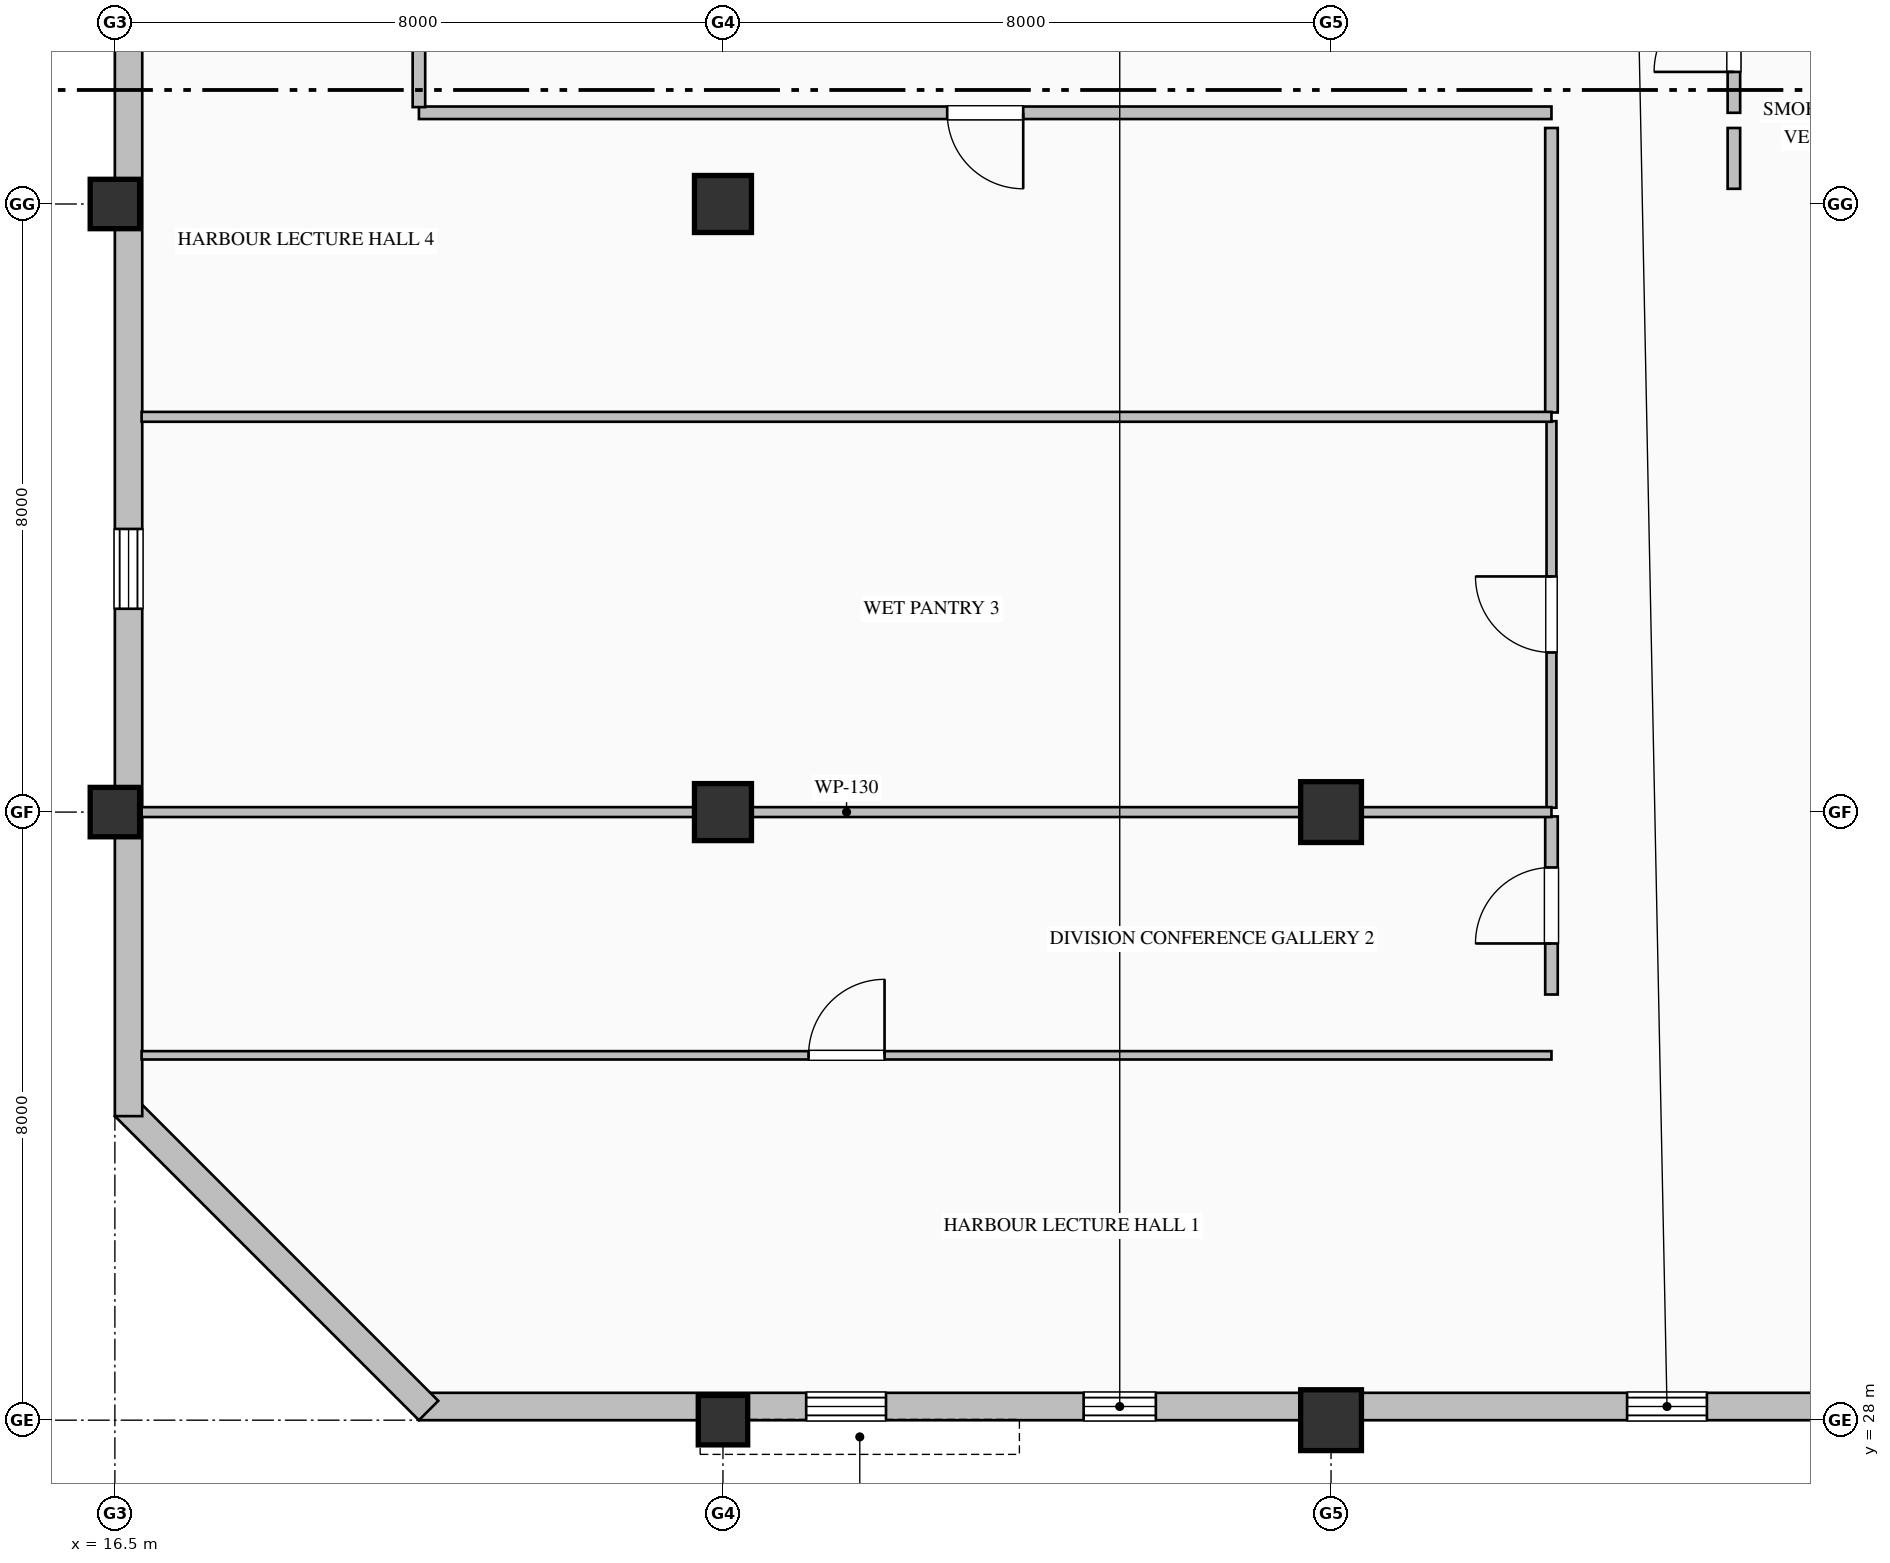
"""IFC4 building model, lengths in metres.
Left out: names, types, materials, properties, quantities, classifications, styles, units other than length and angle.
Written with IfcOpenShell. Run it as: python <this file> out.ifc"""

import sys

from ifc_helpers import new_model, si_unit, direction, frame, frame_2d, origin, origin_2d, place, context, subcontext, project, spatial, rectangle, hollow_rectangle, extrude, element, fill, save


model = new_model("IFC4")
c1 = context("Model", 3, precision=1e-05, world=origin(), true_north=direction((0.0, 1.0)))
c2 = subcontext(c1, "Body", "Model", "MODEL_VIEW")
j1 = project(units=[si_unit("LENGTHUNIT", "METRE"), si_unit("PLANEANGLEUNIT", "RADIAN")], contexts=[c1])
p1 = place(None, origin())
s1 = spatial("IfcSite", under=j1, at=p1, CompositionType="ELEMENT")
p2 = place(p1, origin())
s2 = spatial("IfcBuilding", under=s1, at=p2, CompositionType="ELEMENT")
p3 = place(p2, frame((0.0, 0.0, 311.2)))
s3 = spatial("IfcBuildingStorey", under=s2, at=p3, CompositionType="ELEMENT", Elevation=311.2)
for number, where, z_axis, x_axis in (
    (1, (16.5, 36.0, 0.0), (0.0, 0.0, 1.0), (1.0, 0.0, 0.0)),
    (2, (16.5, 44.0, 0.0), (0.0, 0.0, 1.0), (1.0, 0.0, 0.0)),
    (3, (24.5, 28.0, 0.0), (0.0, 0.0, 1.0), (1.0, 0.0, 0.0)),
):
    element("IfcColumn", number, at=place(p3, frame(where, z_axis=z_axis, x_axis=x_axis)), inside=s3, PredefinedType="COLUMN", context=c2, shape_type="SweptSolid", body=[
        extrude(hollow_rectangle(XDim=0.65, YDim=0.65, WallThickness=0.028, at=origin_2d()), origin(), (0.0, 0.0, 1.0), 4.0),
    ])
for number, where, z_axis, x_axis in (
    (4, (24.5, 36.0, 0.0), (0.0, 0.0, 1.0), (1.0, 0.0, 0.0)),
    (5, (24.5, 44.0, 0.0), (0.0, 0.0, 1.0), (1.0, 0.0, 0.0)),
):
    element("IfcColumn", number, at=place(p3, frame(where, z_axis=z_axis, x_axis=x_axis)), inside=s3, PredefinedType="COLUMN", context=c2, shape_type="SweptSolid", body=[
        extrude(rectangle(XDim=0.75, YDim=0.75, at=origin_2d()), origin(), (0.0, 0.0, 1.0), 4.0),
    ])
for number, where, z_axis, x_axis in (
    (6, (32.5, 28.0, 0.0), (0.0, 0.0, 1.0), (1.0, 0.0, 0.0)),
    (7, (32.5, 36.0, 0.0), (0.0, 0.0, 1.0), (1.0, 0.0, 0.0)),
):
    element("IfcColumn", number, at=place(p3, frame(where, z_axis=z_axis, x_axis=x_axis)), inside=s3, PredefinedType="COLUMN", context=c2, shape_type="SweptSolid", body=[
        extrude(hollow_rectangle(XDim=0.8, YDim=0.8, WallThickness=0.032, at=origin_2d()), origin(), (0.0, 0.0, 1.0), 4.0),
    ])
p4 = place(p3, frame((40.52, 28.18, 0.0), z_axis=(0.0, 0.0, 1.0), x_axis=(-1.0, 0.0, 0.0)))
e8 = element("IfcWall", 8, at=p4, inside=s3, PredefinedType="SOLIDWALL", context=c2, shape_type="SweptSolid", body=[
    extrude(rectangle(XDim=20.02, YDim=0.36, at=frame_2d((10.01, 0.0))), origin(), (0.0, 0.0, 1.0), 3.185),
])
p5 = place(p4, frame((3.075, 0.0, 0.8)))
e9 = element("IfcOpeningElement", 9, at=p5, cuts=e8, PredefinedType="OPENING", context=c2, shape_type="SweptSolid", body=[
    extrude(rectangle(XDim=1.05, YDim=2.15, at=frame_2d((0.525, 1.075))), frame((0.0, 0.19, 0.0), z_axis=(0.0, -1.0, 0.0), x_axis=(1.0, 0.0, 0.0)), (0.0, 0.0, 1.0), 0.38),
])
p6 = place(p4, frame((10.325, 0.0, 0.9)))
e10 = element("IfcOpeningElement", 10, at=p6, cuts=e8, PredefinedType="OPENING", context=c2, shape_type="SweptSolid", body=[
    extrude(rectangle(XDim=0.95, YDim=1.85, at=frame_2d((0.475, 0.925))), frame((0.0, 0.19, 0.0), z_axis=(0.0, -1.0, 0.0), x_axis=(1.0, 0.0, 0.0)), (0.0, 0.0, 1.0), 0.38),
])
p7 = place(p4, frame((13.875, 0.0, 0.8)))
e11 = element("IfcOpeningElement", 11, at=p7, cuts=e8, PredefinedType="OPENING", context=c2, shape_type="SweptSolid", body=[
    extrude(rectangle(XDim=1.05, YDim=2.15, at=frame_2d((0.525, 1.075))), frame((0.0, 0.19, 0.0), z_axis=(0.0, -1.0, 0.0), x_axis=(1.0, 0.0, 0.0)), (0.0, 0.0, 1.0), 0.38),
])
p8 = place(p3, frame((20.627, 28.127, 0.0), z_axis=(0.0, 0.0, 1.0), x_axis=(-0.707106781187, 0.707106781187, 0.0)))
e12 = element("IfcWall", 12, at=p8, inside=s3, PredefinedType="SOLIDWALL", context=c2, shape_type="SweptSolid", body=[
    extrude(rectangle(XDim=5.657, YDim=0.36, at=frame_2d((2.828, 0.0))), origin(), (0.0, 0.0, 1.0), 3.785),
])
p9 = place(p3, frame((16.68, 32.0, 0.0), z_axis=(0.0, 0.0, 1.0), x_axis=(0.0, 1.0, 0.0)))
e13 = element("IfcWall", 13, at=p9, inside=s3, PredefinedType="SOLIDWALL", context=c2, shape_type="SweptSolid", body=[
    extrude(rectangle(XDim=16.0, YDim=0.36, at=frame_2d((8.0, 0.0))), origin(), (0.0, 0.0, 1.0), 3.335),
])
p10 = place(p9, frame((6.675, 0.0, 0.8)))
e14 = element("IfcOpeningElement", 14, at=p10, cuts=e13, PredefinedType="OPENING", context=c2, shape_type="SweptSolid", body=[
    extrude(rectangle(XDim=1.05, YDim=2.15, at=frame_2d((0.525, 1.075))), frame((0.0, 0.19, 0.0), z_axis=(0.0, -1.0, 0.0), x_axis=(1.0, 0.0, 0.0)), (0.0, 0.0, 1.0), 0.38),
])
p11 = place(p3, frame((37.8, 45.2, 0.0), z_axis=(0.0, 0.0, 1.0), x_axis=(0.0, 1.0, 0.0)))
e15 = element("IfcWall", 15, at=p11, inside=s3, PredefinedType="PARTITIONING", context=c2, shape_type="SweptSolid", body=[
    extrude(rectangle(XDim=2.125, YDim=0.165, at=frame_2d((1.063, 0.0))), origin(), (0.0, 0.0, 1.0), 3.785),
])
p12 = place(p11, frame((0.538, 0.0, 0.0)))
e16 = element("IfcOpeningElement", 16, at=p12, cuts=e15, PredefinedType="OPENING", context=c2, shape_type="SweptSolid", body=[
    extrude(rectangle(XDim=1.05, YDim=2.15, at=frame_2d((0.525, 1.075))), frame((0.0, 0.093, 0.0), z_axis=(0.0, -1.0, 0.0), x_axis=(1.0, 0.0, 0.0)), (0.0, 0.0, 1.0), 0.185),
])
p13 = place(p3, frame((37.8, 44.2, 0.0), z_axis=(0.0, 0.0, 1.0), x_axis=(0.0, 1.0, 0.0)))
e17 = element("IfcWall", 17, at=p13, inside=s3, PredefinedType="PARTITIONING", context=c2, shape_type="SweptSolid", body=[
    extrude(rectangle(XDim=0.8, YDim=0.165, at=frame_2d((0.4, 0.0))), origin(), (0.0, 0.0, 1.0), 3.785),
])
p14 = place(p3, frame((35.4, 45.2, 0.0), z_axis=(0.0, 0.0, 1.0), x_axis=(-1.0, 0.0, 0.0)))
e18 = element("IfcWall", 18, at=p14, inside=s3, PredefinedType="PARTITIONING", context=c2, shape_type="SweptSolid", body=[
    extrude(rectangle(XDim=14.9, YDim=0.165, at=frame_2d((7.45, 0.0))), origin(), (0.0, 0.0, 1.0), 3.785),
])
p15 = place(p14, frame((6.95, 0.0, 0.0)))
e19 = element("IfcOpeningElement", 19, at=p15, cuts=e18, PredefinedType="OPENING", context=c2, shape_type="SweptSolid", body=[
    extrude(rectangle(XDim=1.0, YDim=2.15, at=frame_2d((0.5, 1.075))), frame((0.0, 0.093, 0.0), z_axis=(0.0, -1.0, 0.0), x_axis=(1.0, 0.0, 0.0)), (0.0, 0.0, 1.0), 0.185),
])
p16 = place(p3, frame((20.5, 45.274, 0.0), z_axis=(0.0, 0.0, 1.0), x_axis=(0.0, 1.0, 0.0)))
e20 = element("IfcWall", 20, at=p16, inside=s3, PredefinedType="PARTITIONING", context=c2, shape_type="SweptSolid", body=[
    extrude(rectangle(XDim=2.051, YDim=0.165, at=frame_2d((1.025, 0.0))), origin(), (0.0, 0.0, 1.0), 3.785),
])
p17 = place(p3, frame((35.4, 33.6, 0.0), z_axis=(0.0, 0.0, 1.0), x_axis=(0.0, 1.0, 0.0)))
e21 = element("IfcWall", 21, at=p17, inside=s3, PredefinedType="PARTITIONING", context=c2, shape_type="SweptSolid", body=[
    extrude(rectangle(XDim=2.343, YDim=0.165, at=frame_2d((1.171, 0.0))), origin(), (0.0, 0.0, 1.0), 3.785),
])
p18 = place(p17, frame((0.671, 0.0, 0.0)))
e22 = element("IfcOpeningElement", 22, at=p18, cuts=e21, PredefinedType="OPENING", context=c2, shape_type="SweptSolid", body=[
    extrude(rectangle(XDim=1.0, YDim=2.15, at=frame_2d((0.5, 1.075))), frame((0.0, 0.093, 0.0), z_axis=(0.0, -1.0, 0.0), x_axis=(1.0, 0.0, 0.0)), (0.0, 0.0, 1.0), 0.185),
])
p19 = place(p3, frame((35.4, 36.057, 0.0), z_axis=(0.0, 0.0, 1.0), x_axis=(0.0, 1.0, 0.0)))
e23 = element("IfcWall", 23, at=p19, inside=s3, PredefinedType="PARTITIONING", context=c2, shape_type="SweptSolid", body=[
    extrude(rectangle(XDim=5.086, YDim=0.13, at=frame_2d((2.543, 0.0))), origin(), (0.0, 0.0, 1.0), 3.785),
])
p20 = place(p19, frame((2.043, 0.0, 0.0)))
e24 = element("IfcOpeningElement", 24, at=p20, cuts=e23, PredefinedType="OPENING", context=c2, shape_type="SweptSolid", body=[
    extrude(rectangle(XDim=1.0, YDim=2.15, at=frame_2d((0.5, 1.075))), frame((0.0, 0.075, 0.0), z_axis=(0.0, -1.0, 0.0), x_axis=(1.0, 0.0, 0.0)), (0.0, 0.0, 1.0), 0.15),
])
p21 = place(p3, frame((35.4, 41.257, 0.0), z_axis=(0.0, 0.0, 1.0), x_axis=(0.0, 1.0, 0.0)))
e25 = element("IfcWall", 25, at=p21, inside=s3, PredefinedType="PARTITIONING", context=c2, shape_type="SweptSolid", body=[
    extrude(rectangle(XDim=3.743, YDim=0.165, at=frame_2d((1.872, 0.0))), origin(), (0.0, 0.0, 1.0), 3.785),
])
p22 = place(p3, frame((16.852, 32.8, 0.0), z_axis=(0.0, 0.0, 1.0), x_axis=(1.0, 0.0, 0.0)))
e26 = element("IfcWall", 26, at=p22, inside=s3, PredefinedType="MOVABLE", context=c2, shape_type="SweptSolid", body=[
    extrude(rectangle(XDim=18.548, YDim=0.11, at=frame_2d((9.274, 0.0))), origin(), (0.0, 0.0, 1.0), 3.785),
])
p23 = place(p22, frame((8.774, 0.0, 0.0)))
e27 = element("IfcOpeningElement", 27, at=p23, cuts=e26, PredefinedType="OPENING", context=c2, shape_type="SweptSolid", body=[
    extrude(rectangle(XDim=1.0, YDim=2.15, at=frame_2d((0.5, 1.075))), frame((0.0, 0.065, 0.0), z_axis=(0.0, -1.0, 0.0), x_axis=(1.0, 0.0, 0.0)), (0.0, 0.0, 1.0), 0.13),
])
p24 = place(p3, frame((16.852, 36.0, 0.0), z_axis=(0.0, 0.0, 1.0), x_axis=(1.0, 0.0, 0.0)))
e28 = element("IfcWall", 28, at=p24, inside=s3, PredefinedType="PARTITIONING", context=c2, shape_type="SweptSolid", body=[
    extrude(rectangle(XDim=18.548, YDim=0.13, at=frame_2d((9.274, 0.0))), origin(), (0.0, 0.0, 1.0), 3.177),
])
p25 = place(p3, frame((16.852, 41.2, 0.0), z_axis=(0.0, 0.0, 1.0), x_axis=(1.0, 0.0, 0.0)))
e29 = element("IfcWall", 29, at=p25, inside=s3, PredefinedType="PARTITIONING", context=c2, shape_type="SweptSolid", body=[
    extrude(rectangle(XDim=18.548, YDim=0.13, at=frame_2d((9.274, 0.0))), origin(), (0.0, 0.0, 1.0), 3.785),
])
p26 = place(p5, origin())
e30 = element("IfcWindow", 30, at=p26, inside=s3, PartitioningType="SINGLE_PANEL", PredefinedType="WINDOW", context=c2, shape_type="SweptSolid", body=[
    extrude(rectangle(XDim=1.05, YDim=2.15, at=frame_2d((0.525, 1.075))), frame((0.0, 0.15, 0.0), z_axis=(0.0, -1.0, 0.0), x_axis=(1.0, 0.0, 0.0)), (0.0, 0.0, 1.0), 0.06),
])
fill(e9, e30)
p27 = place(p6, origin())
e31 = element("IfcWindow", 31, at=p27, inside=s3, PartitioningType="SINGLE_PANEL", PredefinedType="WINDOW", context=c2, shape_type="SweptSolid", body=[
    extrude(rectangle(XDim=0.95, YDim=1.85, at=frame_2d((0.475, 0.925))), frame((0.0, 0.15, 0.0), z_axis=(0.0, -1.0, 0.0), x_axis=(1.0, 0.0, 0.0)), (0.0, 0.0, 1.0), 0.06),
])
fill(e10, e31)
p28 = place(p7, origin())
e32 = element("IfcWindow", 32, at=p28, inside=s3, PartitioningType="SINGLE_PANEL", PredefinedType="WINDOW", context=c2, shape_type="SweptSolid", body=[
    extrude(rectangle(XDim=1.05, YDim=2.15, at=frame_2d((0.525, 1.075))), frame((0.0, 0.15, 0.0), z_axis=(0.0, -1.0, 0.0), x_axis=(1.0, 0.0, 0.0)), (0.0, 0.0, 1.0), 0.06),
])
fill(e11, e32)
p29 = place(p10, origin())
e33 = element("IfcWindow", 33, at=p29, inside=s3, PartitioningType="SINGLE_PANEL", PredefinedType="WINDOW", context=c2, shape_type="SweptSolid", body=[
    extrude(rectangle(XDim=1.05, YDim=2.15, at=frame_2d((0.525, 1.075))), frame((0.0, 0.15, 0.0), z_axis=(0.0, -1.0, 0.0), x_axis=(1.0, 0.0, 0.0)), (0.0, 0.0, 1.0), 0.06),
])
fill(e14, e33)
p30 = place(p12, origin())
e34 = element("IfcDoor", 34, at=p30, inside=s3, OperationType="SINGLE_SWING_LEFT", PredefinedType="DOOR", context=c2, shape_type="SweptSolid", body=[
    extrude(rectangle(XDim=1.05, YDim=2.15, at=frame_2d((0.525, 1.075))), frame((0.0, 0.025, 0.0), z_axis=(0.0, -1.0, 0.0), x_axis=(1.0, 0.0, 0.0)), (0.0, 0.0, 1.0), 0.05),
])
fill(e16, e34)
p31 = place(p23, origin())
e35 = element("IfcDoor", 35, at=p31, inside=s3, OperationType="SINGLE_SWING_RIGHT", PredefinedType="DOOR", context=c2, shape_type="SweptSolid", body=[
    extrude(rectangle(XDim=1.0, YDim=2.15, at=frame_2d((0.5, 1.075))), frame((0.0, 0.025, 0.0), z_axis=(0.0, -1.0, 0.0), x_axis=(1.0, 0.0, 0.0)), (0.0, 0.0, 1.0), 0.05),
])
fill(e27, e35)
p32 = place(p18, origin())
e36 = element("IfcDoor", 36, at=p32, inside=s3, OperationType="SINGLE_SWING_LEFT", PredefinedType="DOOR", context=c2, shape_type="SweptSolid", body=[
    extrude(rectangle(XDim=1.0, YDim=2.15, at=frame_2d((0.5, 1.075))), frame((0.0, 0.025, 0.0), z_axis=(0.0, -1.0, 0.0), x_axis=(1.0, 0.0, 0.0)), (0.0, 0.0, 1.0), 0.05),
])
fill(e22, e36)
p33 = place(p20, origin())
e37 = element("IfcDoor", 37, at=p33, inside=s3, OperationType="SINGLE_SWING_RIGHT", PredefinedType="DOOR", context=c2, shape_type="SweptSolid", body=[
    extrude(rectangle(XDim=1.0, YDim=2.15, at=frame_2d((0.5, 1.075))), frame((0.0, 0.025, 0.0), z_axis=(0.0, -1.0, 0.0), x_axis=(1.0, 0.0, 0.0)), (0.0, 0.0, 1.0), 0.05),
])
fill(e24, e37)
p34 = place(p15, origin())
e38 = element("IfcDoor", 38, at=p34, inside=s3, OperationType="SINGLE_SWING_LEFT", PredefinedType="DOOR", context=c2, shape_type="SweptSolid", body=[
    extrude(rectangle(XDim=1.0, YDim=2.15, at=frame_2d((0.5, 1.075))), frame((0.0, 0.025, 0.0), z_axis=(0.0, -1.0, 0.0), x_axis=(1.0, 0.0, 0.0)), (0.0, 0.0, 1.0), 0.05),
])
fill(e19, e38)
save(model, sys.argv[1])
